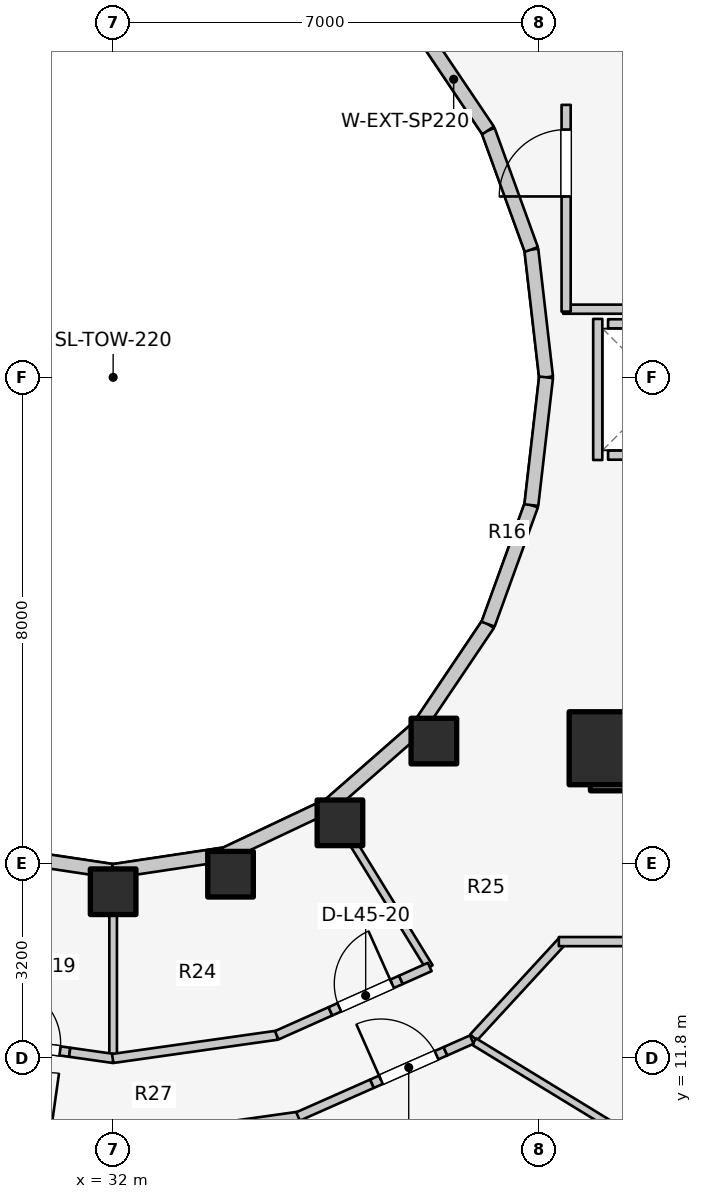
"""IFC4 building model, lengths in metres.
Left out: names, types, materials, properties, quantities, classifications, styles, units other than length and angle.
Written with IfcOpenShell. Run it as: python <this file> out.ifc"""

import sys

from ifc_helpers import new_model, si_unit, direction, frame, frame_2d, origin, origin_2d, place, context, subcontext, project, spatial, rectangle, extrude, element, fill, save


model = new_model("IFC4")
c1 = context("Model", 3, precision=1e-05, world=origin(), true_north=direction((0.0, 1.0)))
c2 = subcontext(c1, "Body", "Model", "MODEL_VIEW")
j1 = project(units=[si_unit("LENGTHUNIT", "METRE"), si_unit("PLANEANGLEUNIT", "RADIAN")], contexts=[c1])
p1 = place(None, origin())
s1 = spatial("IfcSite", under=j1, at=p1, CompositionType="ELEMENT")
p2 = place(p1, origin())
s2 = spatial("IfcBuilding", under=s1, at=p2, CompositionType="ELEMENT")
p3 = place(p2, frame((0.0, 0.0, 149.8)))
s3 = spatial("IfcBuildingStorey", under=s2, at=p3, CompositionType="ELEMENT", Elevation=149.8)
p4 = place(p3, frame((39.85, 16.55, 0.0), z_axis=(0.0, 0.0, 1.0), x_axis=(1.0, 0.0, 0.0)))
e1 = element("IfcWall", 1, at=p4, inside=s3, PredefinedType="SHEAR", context=c2, shape_type="SweptSolid", body=[
    extrude(rectangle(XDim=4.5, YDim=0.7, at=frame_2d((2.25, 0.0))), origin(), (0.0, 0.0, 1.0), 3.1),
])
p5 = place(p3, frame((40.1, 16.9, 0.0), z_axis=(0.0, 0.0, 1.0), x_axis=(1.0, 0.0, 0.0)))
e2 = element("IfcColumn", 2, at=p5, inside=s3, PredefinedType="COLUMN", context=c2, shape_type="SweptSolid", body=[
    extrude(rectangle(XDim=1.2, YDim=1.2, at=origin_2d()), origin(), (0.0, 0.0, 1.0), 3.1),
])
for number, where, z_axis, x_axis in (
    (3, (32.0, 14.54, 0.0), (0.0, 0.0, 1.0), (1.0, 0.0, 0.0)),
    (4, (33.931, 14.828, 0.0), (0.0, 0.0, 1.0), (1.0, 0.0, 0.0)),
    (5, (35.73, 15.673, 0.0), (0.0, 0.0, 1.0), (1.0, 0.0, 0.0)),
    (6, (37.275, 17.018, 0.0), (0.0, 0.0, 1.0), (1.0, 0.0, 0.0)),
):
    element("IfcColumn", number, at=place(p3, frame(where, z_axis=z_axis, x_axis=x_axis)), inside=s3, PredefinedType="COLUMN", context=c2, shape_type="SweptSolid", body=[
        extrude(rectangle(XDim=0.75, YDim=0.75, at=origin_2d()), origin(), (0.0, 0.0, 1.0), 3.1),
    ])
p6 = place(p3, frame((39.12, 23.0, 0.0), z_axis=(0.0, 0.0, 1.0), x_axis=(-0.114711713601, 0.993398823617, 0.0)))
e7 = element("IfcWall", 7, at=p6, inside=s3, PredefinedType="STANDARD", context=c2, shape_type="SweptSolid", body=[
    extrude(rectangle(XDim=2.115, YDim=0.23, at=frame_2d((1.058, 0.0))), origin(), (0.0, 0.0, 1.0), 2.56),
])
p7 = place(p3, frame((38.877, 25.102, 0.0), z_axis=(0.0, 0.0, 1.0), x_axis=(-0.341423187295, 0.93990968033, 0.0)))
e8 = element("IfcWall", 8, at=p7, inside=s3, PredefinedType="STANDARD", context=c2, shape_type="SweptSolid", body=[
    extrude(rectangle(XDim=2.084, YDim=0.23, at=frame_2d((1.042, 0.0))), origin(), (0.0, 0.0, 1.0), 2.56),
])
p8 = place(p3, frame((38.166, 27.06, 0.0), z_axis=(0.0, 0.0, 1.0), x_axis=(-0.558197800898, 0.829707909492, 0.0)))
e9 = element("IfcWall", 9, at=p8, inside=s3, PredefinedType="STANDARD", context=c2, shape_type="SweptSolid", body=[
    extrude(rectangle(XDim=2.027, YDim=0.23, at=frame_2d((1.013, 0.0))), origin(), (0.0, 0.0, 1.0), 1.22),
])
for number, where, z_axis, x_axis in (
    (10, (30.157, 15.157, 0.0), (0.0, 0.0, 1.0), (0.989, -0.149, 0.0)),
    (11, (32.0, 14.88, 0.0), (0.0, 0.0, 1.0), (0.989, 0.149, 0.0)),
):
    element("IfcWall", number, at=place(p3, frame(where, z_axis=z_axis, x_axis=x_axis)), inside=s3, PredefinedType="STANDARD", context=c2, shape_type="SweptSolid", body=[
        extrude(rectangle(XDim=1.864, YDim=0.23, at=frame_2d((0.932, 0.0))), origin(), (0.0, 0.0, 1.0), 1.22),
    ])
p9 = place(p3, frame((33.843, 15.157, 0.0), z_axis=(0.0, 0.0, 1.0), x_axis=(0.904179699603, 0.427152280606, 0.0)))
e12 = element("IfcWall", 12, at=p9, inside=s3, PredefinedType="STANDARD", context=c2, shape_type="SweptSolid", body=[
    extrude(rectangle(XDim=1.899, YDim=0.23, at=frame_2d((0.95, 0.0))), origin(), (0.0, 0.0, 1.0), 1.22),
])
p10 = place(p3, frame((35.56, 15.968, 0.0), z_axis=(0.0, 0.0, 1.0), x_axis=(0.752576694707, 0.658504607869, 0.0)))
e13 = element("IfcWall", 13, at=p10, inside=s3, PredefinedType="STANDARD", context=c2, shape_type="SweptSolid", body=[
    extrude(rectangle(XDim=1.959, YDim=0.23, at=frame_2d((0.98, 0.0))), origin(), (0.0, 0.0, 1.0), 1.22),
])
p11 = place(p3, frame((37.035, 17.258, 0.0), z_axis=(0.0, 0.0, 1.0), x_axis=(0.558197800898, 0.829707909492, 0.0)))
e14 = element("IfcWall", 14, at=p11, inside=s3, PredefinedType="STANDARD", context=c2, shape_type="SweptSolid", body=[
    extrude(rectangle(XDim=2.027, YDim=0.23, at=frame_2d((1.013, 0.0))), origin(), (0.0, 0.0, 1.0), 1.22),
])
p12 = place(p3, frame((38.166, 18.94, 0.0), z_axis=(0.0, 0.0, 1.0), x_axis=(0.341423187295, 0.93990968033, 0.0)))
e15 = element("IfcWall", 15, at=p12, inside=s3, PredefinedType="STANDARD", context=c2, shape_type="SweptSolid", body=[
    extrude(rectangle(XDim=2.084, YDim=0.23, at=frame_2d((1.042, 0.0))), origin(), (0.0, 0.0, 1.0), 2.56),
])
p13 = place(p3, frame((38.877, 20.898, 0.0), z_axis=(0.0, 0.0, 1.0), x_axis=(0.114711713601, 0.993398823617, 0.0)))
e16 = element("IfcWall", 16, at=p13, inside=s3, PredefinedType="STANDARD", context=c2, shape_type="SweptSolid", body=[
    extrude(rectangle(XDim=2.115, YDim=0.23, at=frame_2d((1.058, 0.0))), origin(), (0.0, 0.0, 1.0), 2.56),
])
for number, where, z_axis, x_axis in (
    (17, (40.14, 21.72, 0.0), (0.0, 0.0, 1.0), (1.0, 0.0, 0.0)),
    (18, (40.14, 23.88, 0.0), (0.0, 0.0, 1.0), (1.0, 0.0, 0.0)),
):
    element("IfcWall", number, at=place(p3, frame(where, z_axis=z_axis, x_axis=x_axis)), inside=s3, PredefinedType="SOLIDWALL", context=c2, shape_type="SweptSolid", body=[
        extrude(rectangle(XDim=1.82, YDim=0.15, at=frame_2d((0.91, 0.0))), origin(), (0.0, 0.0, 1.0), 2.12),
    ])
p14 = place(p3, frame((39.97, 21.64, 0.0), z_axis=(0.0, 0.0, 1.0), x_axis=(0.0, 1.0, 0.0)))
e19 = element("IfcWall", 19, at=p14, inside=s3, PredefinedType="SOLIDWALL", context=c2, shape_type="SweptSolid", body=[
    extrude(rectangle(XDim=2.32, YDim=0.15, at=frame_2d((1.16, 0.0))), origin(), (0.0, 0.0, 1.0), 2.12),
])
p15 = place(p3, frame((39.4, 24.12, 0.0), z_axis=(0.0, 0.0, 1.0), x_axis=(1.0, 0.0, 0.0)))
e20 = element("IfcWall", 20, at=p15, inside=s3, PredefinedType="PARTITIONING", context=c2, shape_type="SweptSolid", body=[
    extrude(rectangle(XDim=5.08, YDim=0.15, at=frame_2d((2.54, 0.0))), origin(), (0.0, 0.0, 1.0), 2.12),
])
p16 = place(p3, frame((39.45, 24.08, 0.0), z_axis=(0.0, 0.0, 1.0), x_axis=(0.0, 1.0, 0.0)))
e21 = element("IfcWall", 21, at=p16, inside=s3, PredefinedType="PARTITIONING", context=c2, shape_type="SweptSolid", body=[
    extrude(rectangle(XDim=3.4, YDim=0.15, at=frame_2d((1.7, 0.0))), origin(), (0.0, 0.0, 1.0), 2.575),
])
p17 = place(p16, frame((1.894, 0.0, 0.0)))
e22 = element("IfcOpeningElement", 22, at=p17, cuts=e21, PredefinedType="OPENING", context=c2, shape_type="SweptSolid", body=[
    extrude(rectangle(XDim=1.1, YDim=2.1, at=frame_2d((0.55, 1.05))), frame((0.0, 0.085, 0.0), z_axis=(0.0, -1.0, 0.0), x_axis=(1.0, 0.0, 0.0)), (0.0, 0.0, 1.0), 0.17),
])
p18 = place(p3, frame((37.928, 12.144, 0.0), z_axis=(0.0, 0.0, 1.0), x_axis=(0.677579737957, 0.735449317567, 0.0)))
e23 = element("IfcWall", 23, at=p18, inside=s3, PredefinedType="PARTITIONING", context=c2, shape_type="SweptSolid", body=[
    extrude(rectangle(XDim=2.173, YDim=0.15, at=frame_2d((1.086, 0.0))), origin(), (0.0, 0.0, 1.0), 1.22),
])
p19 = place(p3, frame((39.33, 13.72, 0.0), z_axis=(0.0, 0.0, 1.0), x_axis=(1.0, 0.0, 0.0)))
e24 = element("IfcWall", 24, at=p19, inside=s3, PredefinedType="PARTITIONING", context=c2, shape_type="SweptSolid", body=[
    extrude(rectangle(XDim=5.06, YDim=0.15, at=frame_2d((2.53, 0.0))), origin(), (0.0, 0.0, 1.0), 1.22),
])
p20 = place(p3, frame((32.0, 14.9, 0.0), z_axis=(0.0, 0.0, 1.0), x_axis=(0.0, -1.0, 0.0)))
e25 = element("IfcWall", 25, at=p20, inside=s3, PredefinedType="PARTITIONING", context=c2, shape_type="SweptSolid", body=[
    extrude(rectangle(XDim=3.102, YDim=0.125, at=frame_2d((1.551, 0.0))), origin(), (0.0, 0.0, 1.0), 1.22),
])
p21 = place(p3, frame((35.55, 15.985, 0.0), z_axis=(0.0, 0.0, 1.0), x_axis=(0.523587550846, -0.851971875474, 0.0)))
e26 = element("IfcWall", 26, at=p21, inside=s3, PredefinedType="PARTITIONING", context=c2, shape_type="SweptSolid", body=[
    extrude(rectangle(XDim=3.153, YDim=0.125, at=frame_2d((1.577, 0.0))), origin(), (0.0, 0.0, 1.0), 1.22),
])
p22 = place(p3, frame((30.028, 12.078, 0.0), z_axis=(0.0, 0.0, 1.0), x_axis=(0.990133183593, -0.140129507055, 0.0)))
e27 = element("IfcWall", 27, at=p22, inside=s3, PredefinedType="PARTITIONING", context=c2, shape_type="SweptSolid", body=[
    extrude(rectangle(XDim=1.27, YDim=0.15, at=frame_2d((0.635, 0.0))), origin(), (0.0, 0.0, 1.0), 2.575),
])
p23 = place(p22, frame((0.16, 0.0, 0.0)))
e28 = element("IfcOpeningElement", 28, at=p23, cuts=e27, PredefinedType="OPENING", context=c2, shape_type="SweptSolid", body=[
    extrude(rectangle(XDim=0.95, YDim=2.1, at=frame_2d((0.475, 1.05))), frame((0.0, 0.085, 0.0), z_axis=(0.0, -1.0, 0.0), x_axis=(1.0, 0.0, 0.0)), (0.0, 0.0, 1.0), 0.17),
])
p24 = place(p3, frame((31.285, 11.9, 0.0), z_axis=(0.0, 0.0, 1.0), x_axis=(0.990156034925, -0.139967948123, 0.0)))
e29 = element("IfcWall", 29, at=p24, inside=s3, PredefinedType="PARTITIONING", context=c2, shape_type="SweptSolid", body=[
    extrude(rectangle(XDim=0.729, YDim=0.15, at=frame_2d((0.365, 0.0))), origin(), (0.0, 0.0, 1.0), 1.22),
])
p25 = place(p3, frame((31.993, 11.798, 0.0), z_axis=(0.0, 0.0, 1.0), x_axis=(0.990145400278, 0.140043158738, 0.0)))
e30 = element("IfcWall", 30, at=p25, inside=s3, PredefinedType="PARTITIONING", context=c2, shape_type="SweptSolid", body=[
    extrude(rectangle(XDim=2.728, YDim=0.15, at=frame_2d((1.364, 0.0))), origin(), (0.0, 0.0, 1.0), 1.22),
])
p26 = place(p3, frame((34.69, 12.179, 0.0), z_axis=(0.0, 0.0, 1.0), x_axis=(0.913164738684, 0.407590677057, 0.0)))
e31 = element("IfcWall", 31, at=p26, inside=s3, PredefinedType="PARTITIONING", context=c2, shape_type="SweptSolid", body=[
    extrude(rectangle(XDim=0.967, YDim=0.15, at=frame_2d((0.483, 0.0))), origin(), (0.0, 0.0, 1.0), 1.22),
])
p27 = place(p3, frame((35.573, 12.573, 0.0), z_axis=(0.0, 0.0, 1.0), x_axis=(0.913104656548, 0.407725258219, 0.0)))
e32 = element("IfcWall", 32, at=p27, inside=s3, PredefinedType="PARTITIONING", context=c2, shape_type="SweptSolid", body=[
    extrude(rectangle(XDim=1.27, YDim=0.15, at=frame_2d((0.635, 0.0))), origin(), (0.0, 0.0, 1.0), 2.16),
])
p28 = place(p27, frame((0.16, 0.0, 0.0)))
e33 = element("IfcOpeningElement", 33, at=p28, cuts=e32, PredefinedType="OPENING", context=c2, shape_type="SweptSolid", body=[
    extrude(rectangle(XDim=0.95, YDim=2.1, at=frame_2d((0.475, 1.05))), frame((0.0, 0.085, 0.0), z_axis=(0.0, -1.0, 0.0), x_axis=(1.0, 0.0, 0.0)), (0.0, 0.0, 1.0), 0.17),
])
p29 = place(p3, frame((36.733, 13.091, 0.0), z_axis=(0.0, 0.0, 1.0), x_axis=(0.913209724119, 0.407489876897, 0.0)))
e34 = element("IfcWall", 34, at=p29, inside=s3, PredefinedType="PARTITIONING", context=c2, shape_type="SweptSolid", body=[
    extrude(rectangle(XDim=0.52, YDim=0.15, at=frame_2d((0.26, 0.0))), origin(), (0.0, 0.0, 1.0), 2.575),
])
p30 = place(p3, frame((37.938, 12.075, 0.0), z_axis=(0.0, 0.0, 1.0), x_axis=(0.853440334679, -0.521190555501, 0.0)))
e35 = element("IfcWall", 35, at=p30, inside=s3, PredefinedType="PARTITIONING", context=c2, shape_type="SweptSolid", body=[
    extrude(rectangle(XDim=6.966, YDim=0.125, at=frame_2d((3.483, 0.0))), origin(), (0.0, 0.0, 1.0), 1.22),
])
p31 = place(p3, frame((29.822, 10.725, 0.0), z_axis=(0.0, 0.0, 1.0), x_axis=(0.990250599082, -0.139297347489, 0.0)))
e36 = element("IfcWall", 36, at=p31, inside=s3, PredefinedType="PARTITIONING", context=c2, shape_type="SweptSolid", body=[
    extrude(rectangle(XDim=1.32, YDim=0.15, at=frame_2d((0.66, 0.0))), origin(), (0.0, 0.0, 1.0), 2.575),
])
p32 = place(p31, frame((0.16, 0.0, 0.0)))
e37 = element("IfcOpeningElement", 37, at=p32, cuts=e36, PredefinedType="OPENING", context=c2, shape_type="SweptSolid", body=[
    extrude(rectangle(XDim=1.0, YDim=2.1, at=frame_2d((0.5, 1.05))), frame((0.0, 0.085, 0.0), z_axis=(0.0, -1.0, 0.0), x_axis=(1.0, 0.0, 0.0)), (0.0, 0.0, 1.0), 0.17),
])
p33 = place(p3, frame((31.992, 10.418, 0.0), z_axis=(0.0, 0.0, 1.0), x_axis=(0.990254709652, 0.13926812274, 0.0)))
e38 = element("IfcWall", 38, at=p33, inside=s3, PredefinedType="PARTITIONING", context=c2, shape_type="SweptSolid", body=[
    extrude(rectangle(XDim=3.096, YDim=0.15, at=frame_2d((1.548, 0.0))), origin(), (0.0, 0.0, 1.0), 1.22),
])
p34 = place(p3, frame((35.042, 10.844, 0.0), z_axis=(0.0, 0.0, 1.0), x_axis=(0.91450660596, 0.40457096739, 0.0)))
e39 = element("IfcWall", 39, at=p34, inside=s3, PredefinedType="PARTITIONING", context=c2, shape_type="SweptSolid", body=[
    extrude(rectangle(XDim=1.33, YDim=0.15, at=frame_2d((0.665, 0.0))), origin(), (0.0, 0.0, 1.0), 1.22),
])
p35 = place(p3, frame((36.258, 11.383, 0.0), z_axis=(0.0, 0.0, 1.0), x_axis=(0.914519545761, 0.404541716541, 0.0)))
e40 = element("IfcWall", 40, at=p35, inside=s3, PredefinedType="PARTITIONING", context=c2, shape_type="SweptSolid", body=[
    extrude(rectangle(XDim=1.32, YDim=0.15, at=frame_2d((0.66, 0.0))), origin(), (0.0, 0.0, 1.0), 2.16),
])
p36 = place(p35, frame((0.16, 0.0, 0.0)))
e41 = element("IfcOpeningElement", 41, at=p36, cuts=e40, PredefinedType="OPENING", context=c2, shape_type="SweptSolid", body=[
    extrude(rectangle(XDim=1.0, YDim=2.1, at=frame_2d((0.5, 1.05))), frame((0.0, 0.085, 0.0), z_axis=(0.0, -1.0, 0.0), x_axis=(1.0, 0.0, 0.0)), (0.0, 0.0, 1.0), 0.17),
])
p37 = place(p3, frame((37.465, 11.917, 0.0), z_axis=(0.0, 0.0, 1.0), x_axis=(0.914553664309, 0.4044645783, 0.0)))
e42 = element("IfcWall", 42, at=p37, inside=s3, PredefinedType="PARTITIONING", context=c2, shape_type="SweptSolid", body=[
    extrude(rectangle(XDim=0.474, YDim=0.15, at=frame_2d((0.237, 0.0))), origin(), (0.0, 0.0, 1.0), 2.575),
])
p38 = place(p17, origin())
e43 = element("IfcDoor", 43, at=p38, inside=s3, OperationType="SINGLE_SWING_LEFT", PredefinedType="DOOR", context=c2, shape_type="SweptSolid", body=[
    extrude(rectangle(XDim=1.1, YDim=2.1, at=frame_2d((0.55, 1.05))), frame((0.0, 0.025, 0.0), z_axis=(0.0, -1.0, 0.0), x_axis=(1.0, 0.0, 0.0)), (0.0, 0.0, 1.0), 0.05),
])
fill(e22, e43)
p39 = place(p23, origin())
e44 = element("IfcDoor", 44, at=p39, inside=s3, OperationType="SINGLE_SWING_LEFT", PredefinedType="DOOR", context=c2, shape_type="SweptSolid", body=[
    extrude(rectangle(XDim=0.95, YDim=2.1, at=frame_2d((0.475, 1.05))), frame((0.0, 0.025, 0.0), z_axis=(0.0, -1.0, 0.0), x_axis=(1.0, 0.0, 0.0)), (0.0, 0.0, 1.0), 0.05),
])
fill(e28, e44)
p40 = place(p28, origin())
e45 = element("IfcDoor", 45, at=p40, inside=s3, OperationType="SINGLE_SWING_RIGHT", PredefinedType="DOOR", context=c2, shape_type="SweptSolid", body=[
    extrude(rectangle(XDim=0.95, YDim=2.1, at=frame_2d((0.475, 1.05))), frame((0.0, 0.025, 0.0), z_axis=(0.0, -1.0, 0.0), x_axis=(1.0, 0.0, 0.0)), (0.0, 0.0, 1.0), 0.05),
])
fill(e33, e45)
p41 = place(p36, origin())
e46 = element("IfcDoor", 46, at=p41, inside=s3, OperationType="SINGLE_SWING_LEFT", PredefinedType="DOOR", context=c2, shape_type="SweptSolid", body=[
    extrude(rectangle(XDim=1.0, YDim=2.1, at=frame_2d((0.5, 1.05))), frame((0.0, 0.025, 0.0), z_axis=(0.0, -1.0, 0.0), x_axis=(1.0, 0.0, 0.0)), (0.0, 0.0, 1.0), 0.05),
])
fill(e41, e46)
save(model, sys.argv[1])
